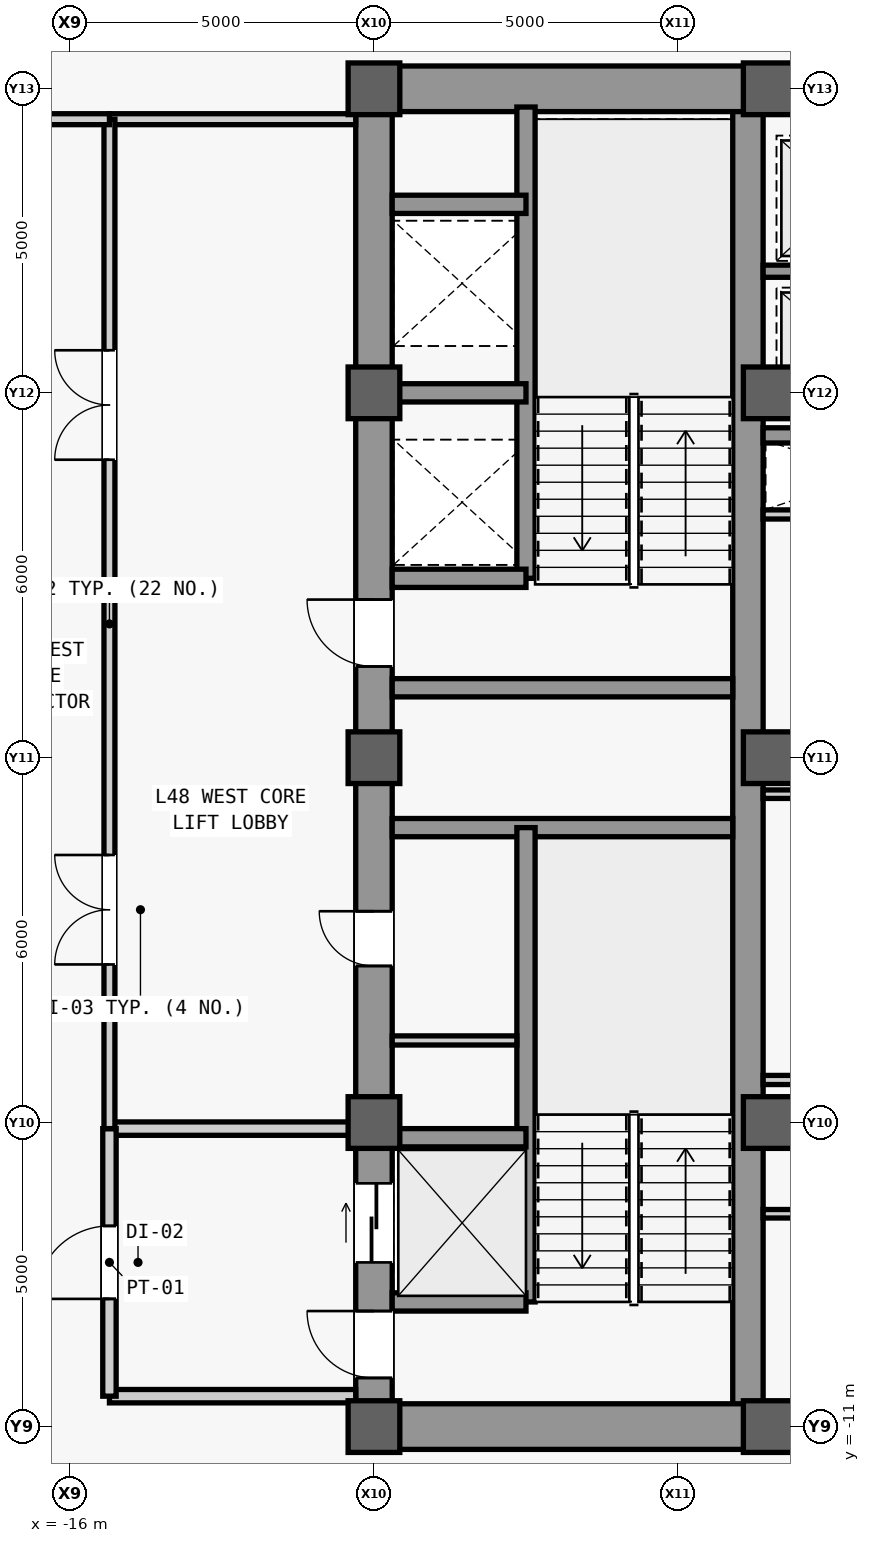
"""IFC4 building model, lengths in metres.
Left out: names, types, materials, properties, quantities, classifications, styles, units other than length and angle.
Written with IfcOpenShell. Run it as: python <this file> out.ifc"""

import sys

from ifc_helpers import new_model, si_unit, direction, frame, frame_2d, origin, origin_2d, place, context, subcontext, project, spatial, rectangle, extrude, source, transform, mapped, element, fill, save


model = new_model("IFC4")
c1 = context("Model", 3, precision=1e-05, world=origin(), true_north=direction((0.0, 1.0)))
c2 = subcontext(c1, "Body", "Model", "MODEL_VIEW")
j1 = project(units=[si_unit("LENGTHUNIT", "METRE"), si_unit("PLANEANGLEUNIT", "RADIAN")], contexts=[c1])
p1 = place(None, origin())
s1 = spatial("IfcSite", under=j1, at=p1, CompositionType="ELEMENT")
p2 = place(p1, origin())
s2 = spatial("IfcBuilding", under=s1, at=p2, CompositionType="ELEMENT")
p3 = place(p2, frame((0.0, 0.0, 207.1)))
s3 = spatial("IfcBuildingStorey", under=s2, at=p3, CompositionType="ELEMENT", Elevation=207.1)
m1 = source(origin(), c2, "Body", "SweptSolid", [
    extrude(rectangle(XDim=22.0, YDim=0.6, at=frame_2d((11.0, 0.0))), origin(), (0.0, 0.0, 1.0), 3.78),
])
p4 = place(p3, frame((-11.0, -11.0, 0.0), z_axis=(0.0, 0.0, 1.0), x_axis=(0.0, 1.0, 0.0)))
e1 = element("IfcWall", 1, at=p4, inside=s3, PredefinedType="SHEAR", context=c2, shape_type="MappedRepresentation", body=[
    mapped(m1, transform((0.0, 0.0, 0.0), scale=1.0)),
])
m2 = source(origin(), c2, "Body", "SweptSolid", [
    extrude(rectangle(XDim=1.1, YDim=2.2, at=frame_2d((0.55, 1.1))), frame((0.0, 0.31, 0.0), z_axis=(0.0, -1.0, 0.0), x_axis=(1.0, 0.0, 0.0)), (0.0, 0.0, 1.0), 0.62),
])
p5 = place(p4, frame((0.8, 0.0, 0.0)))
e2 = element("IfcOpeningElement", 2, at=p5, cuts=e1, PredefinedType="OPENING", context=c2, shape_type="MappedRepresentation", body=[
    mapped(m2, transform((0.0, 0.0, 0.0), scale=1.0)),
])
p6 = place(p4, frame((12.5, 0.0, 0.0)))
e3 = element("IfcOpeningElement", 3, at=p6, cuts=e1, PredefinedType="OPENING", context=c2, shape_type="MappedRepresentation", body=[
    mapped(m2, transform((0.0, 0.0, 0.0), scale=1.0)),
])
m3 = source(origin(), c2, "Body", "SweptSolid", [
    extrude(rectangle(XDim=0.9, YDim=2.15, at=frame_2d((0.45, 1.075))), frame((0.0, 0.31, 0.0), z_axis=(0.0, -1.0, 0.0), x_axis=(1.0, 0.0, 0.0)), (0.0, 0.0, 1.0), 0.62),
])
p7 = place(p4, frame((7.575, 0.0, 0.0)))
e4 = element("IfcOpeningElement", 4, at=p7, cuts=e1, PredefinedType="OPENING", context=c2, shape_type="MappedRepresentation", body=[
    mapped(m3, transform((0.0, 0.0, 0.0), scale=1.0)),
])
m4 = source(origin(), c2, "Body", "SweptSolid", [
    extrude(rectangle(XDim=1.3, YDim=2.3, at=frame_2d((0.65, 1.15))), frame((0.0, 0.31, 0.0), z_axis=(0.0, -1.0, 0.0), x_axis=(1.0, 0.0, 0.0)), (0.0, 0.0, 1.0), 0.62),
])
p8 = place(p4, frame((2.7, 0.0, 0.0)))
e5 = element("IfcOpeningElement", 5, at=p8, cuts=e1, PredefinedType="OPENING", context=c2, shape_type="MappedRepresentation", body=[
    mapped(m4, transform((0.0, 0.0, 0.0), scale=1.0)),
])
m5 = source(origin(), c2, "Body", "SweptSolid", [
    extrude(rectangle(XDim=21.4, YDim=0.5, at=frame_2d((10.7, 0.0))), origin(), (0.0, 0.0, 1.0), 3.78),
])
p9 = place(p3, frame((-4.85, -10.7, 0.0), z_axis=(0.0, 0.0, 1.0), x_axis=(0.0, 1.0, 0.0)))
e6 = element("IfcWall", 6, at=p9, inside=s3, PredefinedType="SHEAR", context=c2, shape_type="MappedRepresentation", body=[
    mapped(m5, transform((0.0, 0.0, 0.0), scale=1.0)),
])
m6 = source(origin(), c2, "Body", "SweptSolid", [
    extrude(rectangle(XDim=5.85, YDim=0.75, at=frame_2d((2.925, 0.0))), origin(), (0.0, 0.0, 1.0), 3.78),
])
for number, where, z_axis, x_axis in (
    (7, (-10.7, -11.0, 0.0), (0.0, 0.0, 1.0), (1.0, 0.0, 0.0)),
    (8, (-10.7, 11.0, 0.0), (0.0, 0.0, 1.0), (1.0, 0.0, 0.0)),
):
    element("IfcWall", number, at=place(p3, frame(where, z_axis=z_axis, x_axis=x_axis)), inside=s3, PredefinedType="SHEAR", context=c2, shape_type="MappedRepresentation", body=[
        mapped(m6, transform((0.0, 0.0, 0.0), scale=1.0)),
    ])
m7 = source(origin(), c2, "Body", "SweptSolid", [
    extrude(rectangle(XDim=5.6, YDim=0.3, at=frame_2d((2.8, 0.0))), origin(), (0.0, 0.0, 1.0), 3.78),
])
for number, where, z_axis, x_axis in (
    (9, (-10.7, -1.15, 0.0), (0.0, 0.0, 1.0), (1.0, 0.0, 0.0)),
    (10, (-10.7, 1.15, 0.0), (0.0, 0.0, 1.0), (1.0, 0.0, 0.0)),
):
    element("IfcWall", number, at=place(p3, frame(where, z_axis=z_axis, x_axis=x_axis)), inside=s3, PredefinedType="SHEAR", context=c2, shape_type="MappedRepresentation", body=[
        mapped(m7, transform((0.0, 0.0, 0.0), scale=1.0)),
    ])
m8 = source(origin(), c2, "Body", "SweptSolid", [
    extrude(rectangle(XDim=9.2, YDim=0.5, at=frame_2d((4.6, 0.0))), origin(), (0.0, 0.0, 1.0), 3.78),
])
p10 = place(p3, frame((-4.6, -11.0, 0.0), z_axis=(0.0, 0.0, 1.0), x_axis=(1.0, 0.0, 0.0)))
e11 = element("IfcWall", 11, at=p10, inside=s3, PredefinedType="SHEAR", context=c2, shape_type="MappedRepresentation", body=[
    mapped(m8, transform((0.0, 0.0, 0.0), scale=1.0)),
])
m9 = source(origin(), c2, "Body", "SweptSolid", [
    extrude(rectangle(XDim=1.8, YDim=2.25, at=frame_2d((0.9, 1.125))), frame((0.0, 0.26, 0.0), z_axis=(0.0, -1.0, 0.0), x_axis=(1.0, 0.0, 0.0)), (0.0, 0.0, 1.0), 0.52),
])
p11 = place(p10, frame((3.7, 0.0, 0.0)))
e12 = element("IfcOpeningElement", 12, at=p11, cuts=e11, PredefinedType="OPENING", context=c2, shape_type="MappedRepresentation", body=[
    mapped(m9, transform((0.0, 0.0, 0.0), scale=1.0)),
])
p12 = place(p3, frame((-4.6, 11.0, 0.0), z_axis=(0.0, 0.0, 1.0), x_axis=(1.0, 0.0, 0.0)))
e13 = element("IfcWall", 13, at=p12, inside=s3, PredefinedType="SHEAR", context=c2, shape_type="MappedRepresentation", body=[
    mapped(m8, transform((0.0, 0.0, 0.0), scale=1.0)),
])
p13 = place(p12, frame((3.7, 0.0, 0.0)))
e14 = element("IfcOpeningElement", 14, at=p13, cuts=e13, PredefinedType="OPENING", context=c2, shape_type="MappedRepresentation", body=[
    mapped(m9, transform((0.0, 0.0, 0.0), scale=1.0)),
])
m10 = source(origin(), c2, "Body", "SweptSolid", [
    extrude(rectangle(XDim=0.85, YDim=0.85, at=origin_2d()), origin(), (0.0, 0.0, 1.0), 4.0),
])
for number, where, z_axis, x_axis in (
    (15, (-11.0, -11.0, 0.0), (0.0, 0.0, 1.0), (1.0, 0.0, 0.0)),
    (16, (-11.0, -6.0, 0.0), (0.0, 0.0, 1.0), (1.0, 0.0, 0.0)),
    (17, (-11.0, 0.0, 0.0), (0.0, 0.0, 1.0), (1.0, 0.0, 0.0)),
    (18, (-11.0, 6.0, 0.0), (0.0, 0.0, 1.0), (1.0, 0.0, 0.0)),
    (19, (-11.0, 11.0, 0.0), (0.0, 0.0, 1.0), (1.0, 0.0, 0.0)),
    (20, (-4.5, -11.0, 0.0), (0.0, 0.0, 1.0), (1.0, 0.0, 0.0)),
    (21, (-4.5, -6.0, 0.0), (0.0, 0.0, 1.0), (1.0, 0.0, 0.0)),
    (22, (-4.5, 0.0, 0.0), (0.0, 0.0, 1.0), (1.0, 0.0, 0.0)),
    (23, (-4.5, 6.0, 0.0), (0.0, 0.0, 1.0), (1.0, 0.0, 0.0)),
    (24, (-4.5, 11.0, 0.0), (0.0, 0.0, 1.0), (1.0, 0.0, 0.0)),
):
    element("IfcColumn", number, at=place(p3, frame(where, z_axis=z_axis, x_axis=x_axis)), inside=s3, PredefinedType="COLUMN", context=c2, shape_type="MappedRepresentation", body=[
        mapped(m10, transform((0.0, 0.0, 0.0), scale=1.0)),
    ])
m11 = source(origin(), c2, "Body", "SweptSolid", [
    extrude(rectangle(XDim=7.8, YDim=0.3, at=frame_2d((3.9, 0.0))), origin(), (0.0, 0.0, 1.0), 3.78),
])
p14 = place(p3, frame((-8.5, -8.95, 0.0), z_axis=(0.0, 0.0, 1.0), x_axis=(0.0, 1.0, 0.0)))
e25 = element("IfcWall", 25, at=p14, inside=s3, PredefinedType="SHEAR", context=c2, shape_type="MappedRepresentation", body=[
    mapped(m11, transform((0.0, 0.0, 0.0), scale=1.0)),
])
m12 = source(origin(), c2, "Body", "SweptSolid", [
    extrude(rectangle(XDim=2.2, YDim=0.3, at=frame_2d((1.1, 0.0))), origin(), (0.0, 0.0, 1.0), 3.78),
])
for number, where, z_axis, x_axis in (
    (26, (-10.7, -8.95, 0.0), (0.0, 0.0, 1.0), (1.0, 0.0, 0.0)),
    (27, (-10.7, -6.25, 0.0), (0.0, 0.0, 1.0), (1.0, 0.0, 0.0)),
):
    element("IfcWall", number, at=place(p3, frame(where, z_axis=z_axis, x_axis=x_axis)), inside=s3, PredefinedType="SHEAR", context=c2, shape_type="MappedRepresentation", body=[
        mapped(m12, transform((0.0, 0.0, 0.0), scale=1.0)),
    ])
m13 = source(origin(), c2, "Body", "SweptSolid", [
    extrude(rectangle(XDim=7.75, YDim=0.3, at=frame_2d((3.875, 0.0))), origin(), (0.0, 0.0, 1.0), 3.78),
])
p15 = place(p3, frame((-8.5, 2.95, 0.0), z_axis=(0.0, 0.0, 1.0), x_axis=(0.0, 1.0, 0.0)))
e28 = element("IfcWall", 28, at=p15, inside=s3, PredefinedType="SHEAR", context=c2, shape_type="MappedRepresentation", body=[
    mapped(m13, transform((0.0, 0.0, 0.0), scale=1.0)),
])
for number, where, z_axis, x_axis in (
    (29, (-10.7, 2.95, 0.0), (0.0, 0.0, 1.0), (1.0, 0.0, 0.0)),
    (30, (-10.7, 6.0, 0.0), (0.0, 0.0, 1.0), (1.0, 0.0, 0.0)),
    (31, (-10.7, 9.1, 0.0), (0.0, 0.0, 1.0), (1.0, 0.0, 0.0)),
):
    element("IfcWall", number, at=place(p3, frame(where, z_axis=z_axis, x_axis=x_axis)), inside=s3, PredefinedType="SHEAR", context=c2, shape_type="MappedRepresentation", body=[
        mapped(m12, transform((0.0, 0.0, 0.0), scale=1.0)),
    ])
m14 = source(origin(), c2, "Body", "SweptSolid", [
    extrude(rectangle(XDim=2.05, YDim=0.15, at=frame_2d((1.025, 0.0))), origin(), (0.0, 0.0, 1.0), 3.78),
])
p16 = place(p3, frame((-10.7, -4.65, 0.0), z_axis=(0.0, 0.0, 1.0), x_axis=(1.0, 0.0, 0.0)))
e32 = element("IfcWall", 32, at=p16, inside=s3, PredefinedType="PARTITIONING", context=c2, shape_type="MappedRepresentation", body=[
    mapped(m14, transform((0.0, 0.0, 0.0), scale=1.0)),
])
m15 = source(origin(), c2, "Body", "SweptSolid", [
    extrude(rectangle(XDim=4.05, YDim=0.22, at=frame_2d((2.025, 0.0))), origin(), (0.0, 0.0, 1.0), 3.78),
])
p17 = place(p3, frame((-15.35, -10.5, 0.0), z_axis=(0.0, 0.0, 1.0), x_axis=(1.0, 0.0, 0.0)))
e33 = element("IfcWall", 33, at=p17, inside=s3, PredefinedType="PARTITIONING", context=c2, shape_type="MappedRepresentation", body=[
    mapped(m15, transform((0.0, 0.0, 0.0), scale=1.0)),
])
m16 = source(origin(), c2, "Body", "SweptSolid", [
    extrude(rectangle(XDim=4.05, YDim=0.22, at=frame_2d((2.025, 0.0))), origin(), (0.0, 0.0, 1.0), 2.38),
])
p18 = place(p3, frame((-15.35, -6.1, 0.0), z_axis=(0.0, 0.0, 1.0), x_axis=(1.0, 0.0, 0.0)))
e34 = element("IfcWall", 34, at=p18, inside=s3, PredefinedType="PARTITIONING", context=c2, shape_type="MappedRepresentation", body=[
    mapped(m16, transform((0.0, 0.0, 0.0), scale=1.0)),
])
m17 = source(origin(), c2, "Body", "SweptSolid", [
    extrude(rectangle(XDim=4.4, YDim=0.22, at=frame_2d((2.2, 0.0))), origin(), (0.0, 0.0, 1.0), 3.78),
])
p19 = place(p3, frame((-15.35, -10.5, 0.0), z_axis=(0.0, 0.0, 1.0), x_axis=(0.0, 1.0, 0.0)))
e35 = element("IfcWall", 35, at=p19, inside=s3, PredefinedType="PARTITIONING", context=c2, shape_type="MappedRepresentation", body=[
    mapped(m17, transform((0.0, 0.0, 0.0), scale=1.0)),
])
m18 = source(origin(), c2, "Body", "SweptSolid", [
    extrude(rectangle(XDim=1.2, YDim=2.2, at=frame_2d((0.6, 1.1))), frame((0.0, 0.12, 0.0), z_axis=(0.0, -1.0, 0.0), x_axis=(1.0, 0.0, 0.0)), (0.0, 0.0, 1.0), 0.24),
])
p20 = place(p19, frame((1.6, 0.0, 0.0)))
e36 = element("IfcOpeningElement", 36, at=p20, cuts=e35, PredefinedType="OPENING", context=c2, shape_type="MappedRepresentation", body=[
    mapped(m18, transform((0.0, 0.0, 0.0), scale=1.0)),
])
m19 = source(origin(), c2, "Body", "SweptSolid", [
    extrude(rectangle(XDim=4.05, YDim=0.18, at=frame_2d((2.025, 0.0))), origin(), (0.0, 0.0, 1.0), 3.78),
])
p21 = place(p3, frame((-15.35, 10.5, 0.0), z_axis=(0.0, 0.0, 1.0), x_axis=(1.0, 0.0, 0.0)))
e37 = element("IfcWall", 37, at=p21, inside=s3, PredefinedType="PARTITIONING", context=c2, shape_type="MappedRepresentation", body=[
    mapped(m19, transform((0.0, 0.0, 0.0), scale=1.0)),
])
m20 = source(origin(), c2, "Body", "SweptSolid", [
    extrude(rectangle(XDim=16.6, YDim=0.18, at=frame_2d((8.3, 0.0))), origin(), (0.0, 0.0, 1.0), 3.78),
])
p22 = place(p3, frame((-15.35, -6.1, 0.0), z_axis=(0.0, 0.0, 1.0), x_axis=(0.0, 1.0, 0.0)))
e38 = element("IfcWall", 38, at=p22, inside=s3, PredefinedType="PARTITIONING", context=c2, shape_type="MappedRepresentation", body=[
    mapped(m20, transform((0.0, 0.0, 0.0), scale=1.0)),
])
m21 = source(origin(), c2, "Body", "SweptSolid", [
    extrude(rectangle(XDim=1.8, YDim=2.25, at=frame_2d((0.9, 1.125))), frame((0.0, 0.1, 0.0), z_axis=(0.0, -1.0, 0.0), x_axis=(1.0, 0.0, 0.0)), (0.0, 0.0, 1.0), 0.2),
])
p23 = place(p22, frame((2.7, 0.0, 0.0)))
e39 = element("IfcOpeningElement", 39, at=p23, cuts=e38, PredefinedType="OPENING", context=c2, shape_type="MappedRepresentation", body=[
    mapped(m21, transform((0.0, 0.0, 0.0), scale=1.0)),
])
p24 = place(p22, frame((11.0, 0.0, 0.0)))
e40 = element("IfcOpeningElement", 40, at=p24, cuts=e38, PredefinedType="OPENING", context=c2, shape_type="MappedRepresentation", body=[
    mapped(m21, transform((0.0, 0.0, 0.0), scale=1.0)),
])
m22 = source(origin(), c2, "Body", "SweptSolid", [
    extrude(rectangle(XDim=3.45, YDim=0.15, at=frame_2d((1.725, 0.0))), origin(), (0.0, 0.0, 1.0), 3.78),
])
p25 = place(p3, frame((-4.6, 4.0, 0.0), z_axis=(0.0, 0.0, 1.0), x_axis=(1.0, 0.0, 0.0)))
e41 = element("IfcWall", 41, at=p25, inside=s3, PredefinedType="PARTITIONING", context=c2, shape_type="MappedRepresentation", body=[
    mapped(m22, transform((0.0, 0.0, 0.0), scale=1.0)),
])
m23 = source(origin(), c2, "Body", "SweptSolid", [
    extrude(rectangle(XDim=3.45, YDim=0.14, at=frame_2d((1.725, 0.0))), origin(), (0.0, 0.0, 1.0), 3.78),
])
p26 = place(p3, frame((-4.6, -7.5, 0.0), z_axis=(0.0, 0.0, 1.0), x_axis=(1.0, 0.0, 0.0)))
e42 = element("IfcWall", 42, at=p26, inside=s3, PredefinedType="PARTITIONING", context=c2, shape_type="MappedRepresentation", body=[
    mapped(m23, transform((0.0, 0.0, 0.0), scale=1.0)),
])
p27 = place(p3, frame((-4.6, -5.3, 0.0), z_axis=(0.0, 0.0, 1.0), x_axis=(1.0, 0.0, 0.0)))
e43 = element("IfcWall", 43, at=p27, inside=s3, PredefinedType="PARTITIONING", context=c2, shape_type="MappedRepresentation", body=[
    mapped(m22, transform((0.0, 0.0, 0.0), scale=1.0)),
])
m24 = source(origin(), c2, "Body", "SweptSolid", [
    extrude(rectangle(XDim=2.45, YDim=0.2, at=frame_2d((1.225, 0.0))), origin(), (0.0, 0.0, 1.0), 3.78),
])
p28 = place(p3, frame((-4.6, 8.0, 0.0), z_axis=(0.0, 0.0, 1.0), x_axis=(1.0, 0.0, 0.0)))
e44 = element("IfcWall", 44, at=p28, inside=s3, PredefinedType="SHEAR", context=c2, shape_type="MappedRepresentation", body=[
    mapped(m24, transform((0.0, 0.0, 0.0), scale=1.0)),
])
m25 = source(origin(), c2, "Body", "SweptSolid", [
    extrude(rectangle(XDim=9.2, YDim=0.25, at=frame_2d((4.6, 0.0))), origin(), (0.0, 0.0, 1.0), 3.78),
])
p29 = place(p3, frame((-4.6, 5.3, 0.0), z_axis=(0.0, 0.0, 1.0), x_axis=(1.0, 0.0, 0.0)))
e45 = element("IfcWall", 45, at=p29, inside=s3, PredefinedType="SHEAR", context=c2, shape_type="MappedRepresentation", body=[
    mapped(m25, transform((0.0, 0.0, 0.0), scale=1.0)),
])
m26 = source(origin(), c2, "Body", "SweptSolid", [
    extrude(rectangle(XDim=1.05, YDim=2.2, at=frame_2d((0.525, 1.1))), frame((0.0, 0.135, 0.0), z_axis=(0.0, -1.0, 0.0), x_axis=(1.0, 0.0, 0.0)), (0.0, 0.0, 1.0), 0.27),
])
p30 = place(p29, frame((4.075, 0.0, 0.0)))
e46 = element("IfcOpeningElement", 46, at=p30, cuts=e45, PredefinedType="OPENING", context=c2, shape_type="MappedRepresentation", body=[
    mapped(m26, transform((0.0, 0.0, 0.0), scale=1.0)),
])
p31 = place(p3, frame((-4.6, -0.6, 0.0), z_axis=(0.0, 0.0, 1.0), x_axis=(1.0, 0.0, 0.0)))
e47 = element("IfcWall", 47, at=p31, inside=s3, PredefinedType="PARTITIONING", context=c2, shape_type="MappedRepresentation", body=[
    mapped(m23, transform((0.0, 0.0, 0.0), scale=1.0)),
])
m27 = source(origin(), c2, "Body", "SweptSolid", [
    extrude(rectangle(XDim=2.45, YDim=0.18, at=frame_2d((1.225, 0.0))), origin(), (0.0, 0.0, 1.0), 3.78),
])
p32 = place(p3, frame((-17.8, 10.5, 0.0), z_axis=(0.0, 0.0, 1.0), x_axis=(1.0, 0.0, 0.0)))
e48 = element("IfcWall", 48, at=p32, inside=s3, PredefinedType="PARTITIONING", context=c2, shape_type="MappedRepresentation", body=[
    mapped(m27, transform((0.0, 0.0, 0.0), scale=1.0)),
])
m28 = source(origin(), c2, "Body", "SweptSolid", [
    extrude(rectangle(XDim=1.1, YDim=2.2, at=frame_2d((0.55, 1.1))), frame((0.0, 0.025, 0.0), z_axis=(0.0, -1.0, 0.0), x_axis=(1.0, 0.0, 0.0)), (0.0, 0.0, 1.0), 0.05),
])
p33 = place(p5, origin())
e49 = element("IfcDoor", 49, at=p33, inside=s3, OperationType="SINGLE_SWING_RIGHT", PredefinedType="DOOR", context=c2, shape_type="MappedRepresentation", body=[
    mapped(m28, transform((0.0, 0.0, 0.0), scale=1.0)),
])
fill(e2, e49)
p34 = place(p6, origin())
e50 = element("IfcDoor", 50, at=p34, inside=s3, OperationType="SINGLE_SWING_RIGHT", PredefinedType="DOOR", context=c2, shape_type="MappedRepresentation", body=[
    mapped(m28, transform((0.0, 0.0, 0.0), scale=1.0)),
])
fill(e3, e50)
m29 = source(origin(), c2, "Body", "SweptSolid", [
    extrude(rectangle(XDim=0.9, YDim=2.15, at=frame_2d((0.45, 1.075))), frame((0.0, 0.025, 0.0), z_axis=(0.0, -1.0, 0.0), x_axis=(1.0, 0.0, 0.0)), (0.0, 0.0, 1.0), 0.05),
])
p35 = place(p7, origin())
e51 = element("IfcDoor", 51, at=p35, inside=s3, OperationType="SINGLE_SWING_RIGHT", PredefinedType="DOOR", context=c2, shape_type="MappedRepresentation", body=[
    mapped(m29, transform((0.0, 0.0, 0.0), scale=1.0)),
])
fill(e4, e51)
m30 = source(origin(), c2, "Body", "SweptSolid", [
    extrude(rectangle(XDim=1.2, YDim=2.2, at=frame_2d((0.6, 1.1))), frame((0.0, 0.025, 0.0), z_axis=(0.0, -1.0, 0.0), x_axis=(1.0, 0.0, 0.0)), (0.0, 0.0, 1.0), 0.05),
])
p36 = place(p20, origin())
e52 = element("IfcDoor", 52, at=p36, inside=s3, OperationType="SINGLE_SWING_LEFT", PredefinedType="DOOR", context=c2, shape_type="MappedRepresentation", body=[
    mapped(m30, transform((0.0, 0.0, 0.0), scale=1.0)),
])
fill(e36, e52)
m31 = source(origin(), c2, "Body", "SweptSolid", [
    extrude(rectangle(XDim=1.8, YDim=2.25, at=frame_2d((0.9, 1.125))), frame((0.0, 0.025, 0.0), z_axis=(0.0, -1.0, 0.0), x_axis=(1.0, 0.0, 0.0)), (0.0, 0.0, 1.0), 0.05),
])
p37 = place(p23, origin())
e53 = element("IfcDoor", 53, at=p37, inside=s3, OperationType="SINGLE_SWING_LEFT", PredefinedType="DOOR", context=c2, shape_type="MappedRepresentation", body=[
    mapped(m31, transform((0.0, 0.0, 0.0), scale=1.0)),
])
fill(e39, e53)
p38 = place(p24, origin())
e54 = element("IfcDoor", 54, at=p38, inside=s3, OperationType="SINGLE_SWING_RIGHT", PredefinedType="DOOR", context=c2, shape_type="MappedRepresentation", body=[
    mapped(m31, transform((0.0, 0.0, 0.0), scale=1.0)),
])
fill(e40, e54)
m32 = source(origin(), c2, "Body", "SweptSolid", [
    extrude(rectangle(XDim=1.3, YDim=2.3, at=frame_2d((0.65, 1.15))), frame((0.0, 0.025, 0.0), z_axis=(0.0, -1.0, 0.0), x_axis=(1.0, 0.0, 0.0)), (0.0, 0.0, 1.0), 0.05),
])
p39 = place(p8, origin())
e55 = element("IfcDoor", 55, at=p39, inside=s3, OperationType="SLIDING_TO_LEFT", PredefinedType="DOOR", context=c2, shape_type="MappedRepresentation", body=[
    mapped(m32, transform((0.0, 0.0, 0.0), scale=1.0)),
])
fill(e5, e55)
save(model, sys.argv[1])
